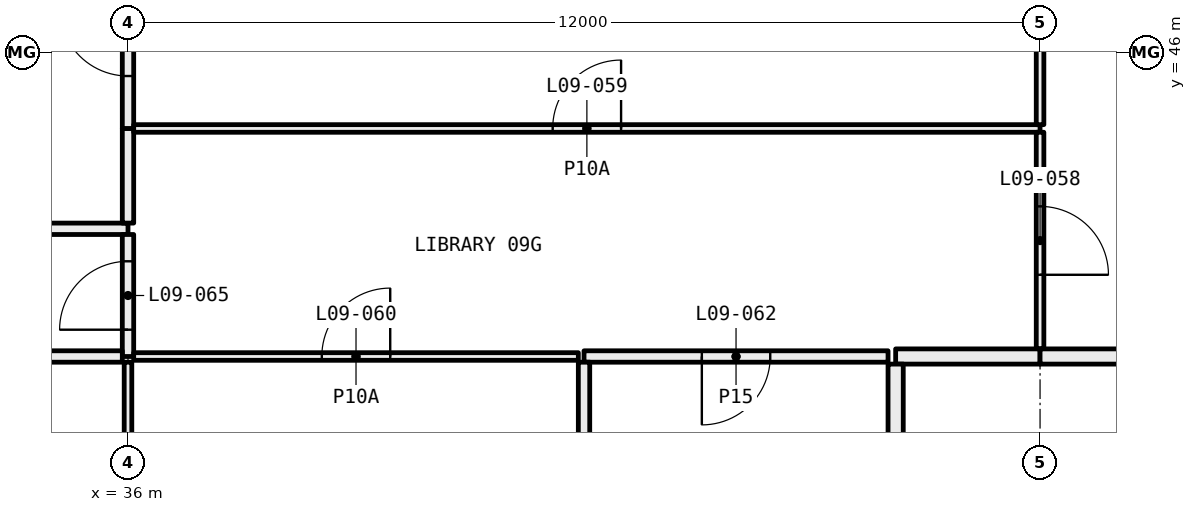
"""IFC4 building model, lengths in metres.
Left out: names, types, materials, properties, quantities, classifications, styles, units other than length and angle.
Written with IfcOpenShell. Run it as: python <this file> out.ifc"""

import sys

from ifc_helpers import new_model, si_unit, direction, frame, frame_2d, origin, place, context, subcontext, project, spatial, rectangle, extrude, element, fill, save


model = new_model("IFC4")
c1 = context("Model", 3, precision=1e-05, world=origin(), true_north=direction((0.0, 1.0)))
c2 = subcontext(c1, "Body", "Model", "MODEL_VIEW")
j1 = project(units=[si_unit("LENGTHUNIT", "METRE"), si_unit("PLANEANGLEUNIT", "RADIAN")], contexts=[c1])
p1 = place(None, origin())
s1 = spatial("IfcSite", under=j1, at=p1, CompositionType="ELEMENT")
p2 = place(p1, origin())
s2 = spatial("IfcBuilding", under=s1, at=p2, CompositionType="ELEMENT")
p3 = place(p2, frame((0.0, 0.0, 43.8)))
s3 = spatial("IfcBuildingStorey", under=s2, at=p3, CompositionType="ELEMENT", Elevation=43.8)
p4 = place(p3, frame((30.1, 43.68, 0.0), z_axis=(0.0, 0.0, 1.0), x_axis=(1.0, 0.0, 0.0)))
e1 = element("IfcWall", 1, at=p4, inside=s3, PredefinedType="PARTITIONING", context=c2, shape_type="SweptSolid", body=[
    extrude(rectangle(XDim=5.9, YDim=0.15, at=frame_2d((2.95, 0.0))), origin(), (0.0, 0.0, 1.0), 2.45),
])
p5 = place(p3, frame((36.0, 43.755, 0.0), z_axis=(0.0, 0.0, 1.0), x_axis=(0.0, 1.0, 0.0)))
e2 = element("IfcWall", 2, at=p5, inside=s3, PredefinedType="PARTITIONING", context=c2, shape_type="SweptSolid", body=[
    extrude(rectangle(XDim=1.245, YDim=0.15, at=frame_2d((0.623, 0.0))), origin(), (0.0, 0.0, 1.0), 2.45),
])
p6 = place(p3, frame((36.0, 45.0, 0.0), z_axis=(0.0, 0.0, 1.0), x_axis=(0.0, 1.0, 0.0)))
e3 = element("IfcWall", 3, at=p6, inside=s3, PredefinedType="PARTITIONING", context=c2, shape_type="SweptSolid", body=[
    extrude(rectangle(XDim=2.28, YDim=0.15, at=frame_2d((1.14, 0.0))), origin(), (0.0, 0.0, 1.0), 2.45),
])
p7 = place(p6, frame((0.69, 0.0, 0.0)))
e4 = element("IfcOpeningElement", 4, at=p7, cuts=e3, PredefinedType="OPENING", context=c2, shape_type="SweptSolid", body=[
    extrude(rectangle(XDim=0.9, YDim=2.1, at=frame_2d((0.45, 1.05))), frame((0.0, 0.085, 0.0), z_axis=(0.0, -1.0, 0.0), x_axis=(1.0, 0.0, 0.0)), (0.0, 0.0, 1.0), 0.17),
])
p8 = place(p3, frame((36.0, 42.0, 0.0), z_axis=(0.0, 0.0, 1.0), x_axis=(0.0, 1.0, 0.0)))
e5 = element("IfcWall", 5, at=p8, inside=s3, PredefinedType="PARTITIONING", context=c2, shape_type="SweptSolid", body=[
    extrude(rectangle(XDim=1.605, YDim=0.15, at=frame_2d((0.802, 0.0))), origin(), (0.0, 0.0, 1.0), 2.45),
])
p9 = place(p8, frame((0.353, 0.0, 0.0)))
e6 = element("IfcOpeningElement", 6, at=p9, cuts=e5, PredefinedType="OPENING", context=c2, shape_type="SweptSolid", body=[
    extrude(rectangle(XDim=0.9, YDim=2.1, at=frame_2d((0.45, 1.05))), frame((0.0, 0.085, 0.0), z_axis=(0.0, -1.0, 0.0), x_axis=(1.0, 0.0, 0.0)), (0.0, 0.0, 1.0), 0.17),
])
p10 = place(p3, frame((30.1, 42.0, 0.0), z_axis=(0.0, 0.0, 1.0), x_axis=(1.0, 0.0, 0.0)))
e7 = element("IfcWall", 7, at=p10, inside=s3, PredefinedType="PARTITIONING", context=c2, shape_type="SweptSolid", body=[
    extrude(rectangle(XDim=5.825, YDim=0.15, at=frame_2d((2.913, 0.0))), origin(), (0.0, 0.0, 1.0), 2.45),
])
p11 = place(p3, frame((48.0, 45.0, 0.0), z_axis=(0.0, 0.0, 1.0), x_axis=(-1.0, 0.0, 0.0)))
e8 = element("IfcWall", 8, at=p11, inside=s3, PredefinedType="PARTITIONING", context=c2, shape_type="SweptSolid", body=[
    extrude(rectangle(XDim=11.925, YDim=0.1, at=frame_2d((5.962, 0.0))), origin(), (0.0, 0.0, 1.0), 2.45),
])
p12 = place(p11, frame((5.512, 0.0, 0.0)))
e9 = element("IfcOpeningElement", 9, at=p12, cuts=e8, PredefinedType="OPENING", context=c2, shape_type="SweptSolid", body=[
    extrude(rectangle(XDim=0.9, YDim=2.1, at=frame_2d((0.45, 1.05))), frame((0.0, 0.06, 0.0), z_axis=(0.0, -1.0, 0.0), x_axis=(1.0, 0.0, 0.0)), (0.0, 0.0, 1.0), 0.12),
])
p13 = place(p3, frame((48.0, 42.1, 0.0), z_axis=(0.0, 0.0, 1.0), x_axis=(0.0, 1.0, 0.0)))
e10 = element("IfcWall", 10, at=p13, inside=s3, PredefinedType="PARTITIONING", context=c2, shape_type="SweptSolid", body=[
    extrude(rectangle(XDim=2.85, YDim=0.1, at=frame_2d((1.425, 0.0))), origin(), (0.0, 0.0, 1.0), 3.05),
])
p14 = place(p13, frame((0.975, 0.0, 0.0)))
e11 = element("IfcOpeningElement", 11, at=p14, cuts=e10, PredefinedType="OPENING", context=c2, shape_type="SweptSolid", body=[
    extrude(rectangle(XDim=0.9, YDim=2.1, at=frame_2d((0.45, 1.05))), frame((0.0, 0.06, 0.0), z_axis=(0.0, -1.0, 0.0), x_axis=(1.0, 0.0, 0.0)), (0.0, 0.0, 1.0), 0.12),
])
p15 = place(p3, frame((36.075, 42.0, 0.0), z_axis=(0.0, 0.0, 1.0), x_axis=(1.0, 0.0, 0.0)))
e12 = element("IfcWall", 12, at=p15, inside=s3, PredefinedType="PARTITIONING", context=c2, shape_type="SweptSolid", body=[
    extrude(rectangle(XDim=5.85, YDim=0.1, at=frame_2d((2.925, 0.0))), origin(), (0.0, 0.0, 1.0), 2.45),
])
p16 = place(p15, frame((2.475, 0.0, 0.0)))
e13 = element("IfcOpeningElement", 13, at=p16, cuts=e12, PredefinedType="OPENING", context=c2, shape_type="SweptSolid", body=[
    extrude(rectangle(XDim=0.9, YDim=2.1, at=frame_2d((0.45, 1.05))), frame((0.0, 0.06, 0.0), z_axis=(0.0, -1.0, 0.0), x_axis=(1.0, 0.0, 0.0)), (0.0, 0.0, 1.0), 0.12),
])
p17 = place(p3, frame((42.0, 42.0, 0.0), z_axis=(0.0, 0.0, 1.0), x_axis=(1.0, 0.0, 0.0)))
e14 = element("IfcWall", 14, at=p17, inside=s3, PredefinedType="PARTITIONING", context=c2, shape_type="SweptSolid", body=[
    extrude(rectangle(XDim=4.0, YDim=0.15, at=frame_2d((2.0, 0.0))), origin(), (0.0, 0.0, 1.0), 3.05),
])
p18 = place(p17, frame((1.55, 0.0, 0.0)))
e15 = element("IfcOpeningElement", 15, at=p18, cuts=e14, PredefinedType="OPENING", context=c2, shape_type="SweptSolid", body=[
    extrude(rectangle(XDim=0.9, YDim=2.1, at=frame_2d((0.45, 1.05))), frame((0.0, 0.085, 0.0), z_axis=(0.0, -1.0, 0.0), x_axis=(1.0, 0.0, 0.0)), (0.0, 0.0, 1.0), 0.17),
])
p19 = place(p3, frame((46.1, 42.0, 0.0), z_axis=(0.0, 0.0, 1.0), x_axis=(1.0, 0.0, 0.0)))
e16 = element("IfcWall", 16, at=p19, inside=s3, PredefinedType="PARTITIONING", context=c2, shape_type="SweptSolid", body=[
    extrude(rectangle(XDim=1.9, YDim=0.2, at=frame_2d((0.95, 0.0))), origin(), (0.0, 0.0, 1.0), 3.05),
])
p20 = place(p3, frame((48.0, 45.05, 0.0), z_axis=(0.0, 0.0, 1.0), x_axis=(0.0, 1.0, 0.0)))
e17 = element("IfcWall", 17, at=p20, inside=s3, PredefinedType="PARTITIONING", context=c2, shape_type="SweptSolid", body=[
    extrude(rectangle(XDim=2.23, YDim=0.1, at=frame_2d((1.115, 0.0))), origin(), (0.0, 0.0, 1.0), 3.05),
])
p21 = place(p3, frame((48.0, 42.0, 0.0), z_axis=(0.0, 0.0, 1.0), x_axis=(1.0, 0.0, 0.0)))
e18 = element("IfcWall", 18, at=p21, inside=s3, PredefinedType="PARTITIONING", context=c2, shape_type="SweptSolid", body=[
    extrude(rectangle(XDim=6.0, YDim=0.2, at=frame_2d((3.0, 0.0))), origin(), (0.0, 0.0, 1.0), 3.05),
])
p22 = place(p3, frame((36.0, 36.8, 0.0), z_axis=(0.0, 0.0, 1.0), x_axis=(0.0, 1.0, 0.0)))
e19 = element("IfcWall", 19, at=p22, inside=s3, PredefinedType="PARTITIONING", context=c2, shape_type="SweptSolid", body=[
    extrude(rectangle(XDim=5.125, YDim=0.1, at=frame_2d((2.562, 0.0))), origin(), (0.0, 0.0, 1.0), 2.45),
])
p23 = place(p22, frame((2.113, 0.0, 0.0)))
e20 = element("IfcOpeningElement", 20, at=p23, cuts=e19, PredefinedType="OPENING", context=c2, shape_type="SweptSolid", body=[
    extrude(rectangle(XDim=0.9, YDim=2.1, at=frame_2d((0.45, 1.05))), frame((0.0, 0.06, 0.0), z_axis=(0.0, -1.0, 0.0), x_axis=(1.0, 0.0, 0.0)), (0.0, 0.0, 1.0), 0.12),
])
p24 = place(p3, frame((42.0, 38.1, 0.0), z_axis=(0.0, 0.0, 1.0), x_axis=(0.0, 1.0, 0.0)))
e21 = element("IfcWall", 21, at=p24, inside=s3, PredefinedType="PARTITIONING", context=c2, shape_type="SweptSolid", body=[
    extrude(rectangle(XDim=3.825, YDim=0.15, at=frame_2d((1.913, 0.0))), origin(), (0.0, 0.0, 1.0), 3.05),
])
p25 = place(p3, frame((46.1, 38.1, 0.0), z_axis=(0.0, 0.0, 1.0), x_axis=(0.0, 1.0, 0.0)))
e22 = element("IfcWall", 22, at=p25, inside=s3, PredefinedType="PARTITIONING", context=c2, shape_type="SweptSolid", body=[
    extrude(rectangle(XDim=3.8, YDim=0.2, at=frame_2d((1.9, 0.0))), origin(), (0.0, 0.0, 1.0), 3.05),
])
p26 = place(p14, frame((0.9, 0.0, 0.0), x_axis=(-1.0, 0.0, 0.0)))
e23 = element("IfcDoor", 23, at=p26, inside=s3, OperationType="SINGLE_SWING_LEFT", PredefinedType="DOOR", context=c2, shape_type="SweptSolid", body=[
    extrude(rectangle(XDim=0.9, YDim=2.1, at=frame_2d((0.45, 1.05))), frame((0.0, 0.025, 0.0), z_axis=(0.0, -1.0, 0.0), x_axis=(1.0, 0.0, 0.0)), (0.0, 0.0, 1.0), 0.05),
])
fill(e11, e23)
p27 = place(p12, frame((0.9, 0.0, 0.0), x_axis=(-1.0, 0.0, 0.0)))
e24 = element("IfcDoor", 24, at=p27, inside=s3, OperationType="SINGLE_SWING_LEFT", PredefinedType="DOOR", context=c2, shape_type="SweptSolid", body=[
    extrude(rectangle(XDim=0.9, YDim=2.1, at=frame_2d((0.45, 1.05))), frame((0.0, 0.025, 0.0), z_axis=(0.0, -1.0, 0.0), x_axis=(1.0, 0.0, 0.0)), (0.0, 0.0, 1.0), 0.05),
])
fill(e9, e24)
p28 = place(p16, origin())
e25 = element("IfcDoor", 25, at=p28, inside=s3, OperationType="SINGLE_SWING_LEFT", PredefinedType="DOOR", context=c2, shape_type="SweptSolid", body=[
    extrude(rectangle(XDim=0.9, YDim=2.1, at=frame_2d((0.45, 1.05))), frame((0.0, 0.025, 0.0), z_axis=(0.0, -1.0, 0.0), x_axis=(1.0, 0.0, 0.0)), (0.0, 0.0, 1.0), 0.05),
])
fill(e13, e25)
p29 = place(p18, frame((0.9, 0.0, 0.0), x_axis=(-1.0, 0.0, 0.0)))
e26 = element("IfcDoor", 26, at=p29, inside=s3, OperationType="SINGLE_SWING_LEFT", PredefinedType="DOOR", context=c2, shape_type="SweptSolid", body=[
    extrude(rectangle(XDim=0.9, YDim=2.1, at=frame_2d((0.45, 1.05))), frame((0.0, 0.025, 0.0), z_axis=(0.0, -1.0, 0.0), x_axis=(1.0, 0.0, 0.0)), (0.0, 0.0, 1.0), 0.05),
])
fill(e15, e26)
p30 = place(p7, origin())
e27 = element("IfcDoor", 27, at=p30, inside=s3, OperationType="SINGLE_SWING_LEFT", PredefinedType="DOOR", context=c2, shape_type="SweptSolid", body=[
    extrude(rectangle(XDim=0.9, YDim=2.1, at=frame_2d((0.45, 1.05))), frame((0.0, 0.025, 0.0), z_axis=(0.0, -1.0, 0.0), x_axis=(1.0, 0.0, 0.0)), (0.0, 0.0, 1.0), 0.05),
])
fill(e4, e27)
p31 = place(p9, origin())
e28 = element("IfcDoor", 28, at=p31, inside=s3, OperationType="SINGLE_SWING_RIGHT", PredefinedType="DOOR", context=c2, shape_type="SweptSolid", body=[
    extrude(rectangle(XDim=0.9, YDim=2.1, at=frame_2d((0.45, 1.05))), frame((0.0, 0.025, 0.0), z_axis=(0.0, -1.0, 0.0), x_axis=(1.0, 0.0, 0.0)), (0.0, 0.0, 1.0), 0.05),
])
fill(e6, e28)
save(model, sys.argv[1])
